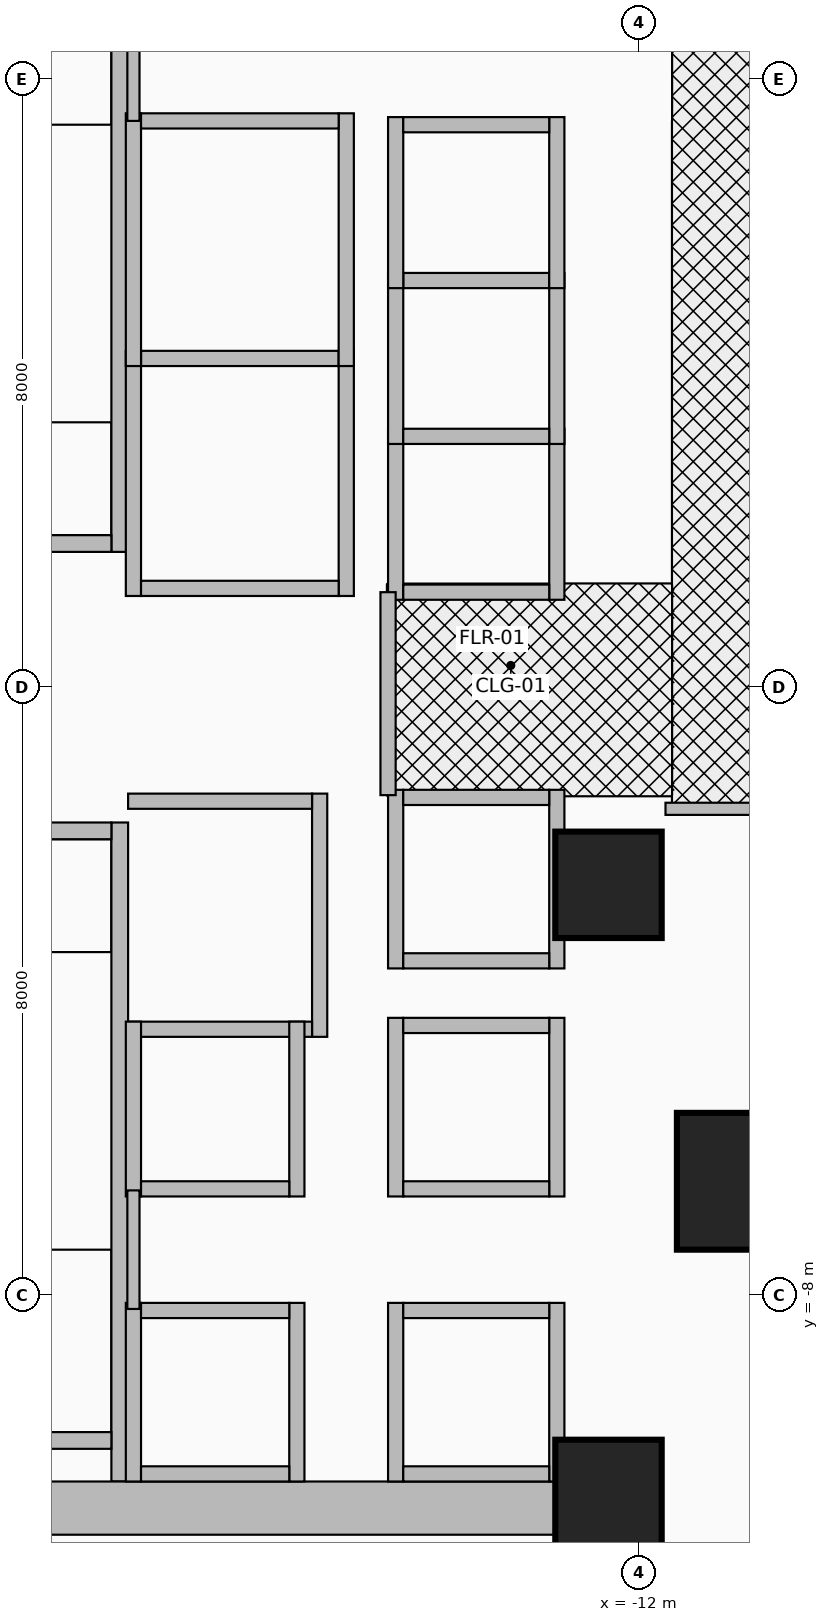
"""IFC4 building model, lengths in metres.
Left out: names, types, materials, properties, quantities, classifications, styles, units other than length and angle.
Written with IfcOpenShell. Run it as: python <this file> out.ifc"""

import sys

from ifc_helpers import new_model, si_unit, direction, frame, frame_2d, origin, origin_2d, place, context, subcontext, project, spatial, rectangle, extrude, source, transform, mapped, element, fill, save


model = new_model("IFC4")
c1 = context("Model", 3, precision=1e-05, world=origin(), true_north=direction((0.0, 1.0)))
c2 = subcontext(c1, "Body", "Model", "MODEL_VIEW")
j1 = project(units=[si_unit("LENGTHUNIT", "METRE"), si_unit("PLANEANGLEUNIT", "RADIAN")], contexts=[c1])
p1 = place(None, origin())
s1 = spatial("IfcSite", under=j1, at=p1, CompositionType="ELEMENT")
p2 = place(p1, origin())
s2 = spatial("IfcBuilding", under=s1, at=p2, CompositionType="ELEMENT")
p3 = place(p2, frame((0.0, 0.0, 20.8)))
s3 = spatial("IfcBuildingStorey", under=s2, at=p3, CompositionType="ELEMENT", Elevation=20.8)
p4 = place(p3, frame((-18.83, 1.78, 0.0), z_axis=(0.0, 0.0, 1.0), x_axis=(0.0, 1.0, 0.0)))
e1 = element("IfcWall", 1, at=p4, inside=s3, PredefinedType="SHEAR", context=c2, shape_type="SweptSolid", body=[
    extrude(rectangle(XDim=8.67, YDim=0.22, at=frame_2d((4.335, 0.0))), origin(), (0.0, 0.0, 1.0), 4.96),
])
p5 = place(p3, frame((-22.05, 1.89, 0.0), z_axis=(0.0, 0.0, 1.0), x_axis=(1.0, 0.0, 0.0)))
e2 = element("IfcWall", 2, at=p5, inside=s3, PredefinedType="SHEAR", context=c2, shape_type="SweptSolid", body=[
    extrude(rectangle(XDim=3.11, YDim=0.22, at=frame_2d((1.555, 0.0))), origin(), (0.0, 0.0, 1.0), 4.96),
])
p6 = place(p5, frame((1.0, 0.0, 0.0)))
e3 = element("IfcOpeningElement", 3, at=p6, cuts=e2, PredefinedType="OPENING", context=c2, shape_type="SweptSolid", body=[
    extrude(rectangle(XDim=1.1, YDim=2.15, at=frame_2d((0.55, 1.075))), frame((0.0, 0.125, 0.0), z_axis=(0.0, -1.0, 0.0), x_axis=(1.0, 0.0, 0.0)), (0.0, 0.0, 1.0), 0.25),
])
p7 = place(p3, frame((-18.83, -10.45, 0.0), z_axis=(0.0, 0.0, 1.0), x_axis=(0.0, 1.0, 0.0)))
e4 = element("IfcWall", 4, at=p7, inside=s3, PredefinedType="SHEAR", context=c2, shape_type="SweptSolid", body=[
    extrude(rectangle(XDim=8.67, YDim=0.22, at=frame_2d((4.335, 0.0))), origin(), (0.0, 0.0, 1.0), 4.96),
])
p8 = place(p3, frame((-22.05, -9.91, 0.0), z_axis=(0.0, 0.0, 1.0), x_axis=(1.0, 0.0, 0.0)))
e5 = element("IfcWall", 5, at=p8, inside=s3, PredefinedType="SHEAR", context=c2, shape_type="SweptSolid", body=[
    extrude(rectangle(XDim=3.11, YDim=0.22, at=frame_2d((1.555, 0.0))), origin(), (0.0, 0.0, 1.0), 4.96),
])
p9 = place(p3, frame((-22.05, -1.89, 0.0), z_axis=(0.0, 0.0, 1.0), x_axis=(1.0, 0.0, 0.0)))
e6 = element("IfcWall", 6, at=p9, inside=s3, PredefinedType="SHEAR", context=c2, shape_type="SweptSolid", body=[
    extrude(rectangle(XDim=3.11, YDim=0.22, at=frame_2d((1.555, 0.0))), origin(), (0.0, 0.0, 1.0), 4.96),
])
p10 = place(p9, frame((1.0, 0.0, 0.0)))
e7 = element("IfcOpeningElement", 7, at=p10, cuts=e6, PredefinedType="OPENING", context=c2, shape_type="SweptSolid", body=[
    extrude(rectangle(XDim=1.1, YDim=2.15, at=frame_2d((0.55, 1.075))), frame((0.0, 0.125, 0.0), z_axis=(0.0, -1.0, 0.0), x_axis=(1.0, 0.0, 0.0)), (0.0, 0.0, 1.0), 0.25),
])
p11 = place(p3, frame((-22.65, -10.8, 0.0), z_axis=(0.0, 0.0, 1.0), x_axis=(1.0, 0.0, 0.0)))
e8 = element("IfcWall", 8, at=p11, inside=s3, PredefinedType="SHEAR", context=c2, shape_type="SweptSolid", body=[
    extrude(rectangle(XDim=10.25, YDim=0.7, at=frame_2d((5.125, 0.0))), origin(), (0.0, 0.0, 1.0), 4.96),
])
m1 = source(origin(), c2, "Body", "SweptSolid", [
    extrude(rectangle(XDim=1.4, YDim=1.4, at=origin_2d()), origin(), (0.0, 0.0, 1.0), 5.2),
])
for number, where, z_axis, x_axis in (
    (9, (-12.4, -10.6, 0.0), (0.0, 0.0, 1.0), (1.0, 0.0, 0.0)),
    (10, (-12.4, -2.6, 0.0), (0.0, 0.0, 1.0), (1.0, 0.0, 0.0)),
):
    element("IfcColumn", number, at=place(p3, frame(where, z_axis=z_axis, x_axis=x_axis)), inside=s3, PredefinedType="COLUMN", context=c2, shape_type="MappedRepresentation", body=[
        mapped(m1, transform((0.0, 0.0, 0.0), x_axis=(1.0, 0.0, 0.0), y_axis=(0.0, 1.0, 0.0), z_axis=(0.0, 0.0, 1.0), scale=1.0)),
    ])
m2 = source(origin(), c2, "Body", "SweptSolid", [
    extrude(rectangle(XDim=1.8, YDim=1.8, at=origin_2d()), origin(), (0.0, 0.0, 1.0), 5.2),
])
p12 = place(p3, frame((-10.6, -6.5, 0.0), z_axis=(0.0, 0.0, 1.0), x_axis=(1.0, 0.0, 0.0)))
e11 = element("IfcColumn", 11, at=p12, inside=s3, PredefinedType="COLUMN", context=c2, shape_type="MappedRepresentation", body=[
    mapped(m2, transform((0.0, 0.0, 0.0), x_axis=(1.0, 0.0, 0.0), y_axis=(0.0, 1.0, 0.0), z_axis=(0.0, 0.0, 1.0), scale=1.0)),
])
for number, where, z_axis, x_axis in (
    (12, (-18.65, 1.2, 0.0), (0.0, 0.0, 1.0), (0.0, 1.0, 0.0)),
    (13, (-15.85, 1.2, 0.0), (0.0, 0.0, 1.0), (0.0, 1.0, 0.0)),
):
    element("IfcWall", number, at=place(p3, frame(where, z_axis=z_axis, x_axis=x_axis)), inside=s3, PredefinedType="MOVABLE", context=c2, shape_type="SweptSolid", body=[
        extrude(rectangle(XDim=3.225, YDim=0.2, at=frame_2d((1.613, 0.0))), origin(), (0.0, 0.0, 1.0), 4.96),
    ])
p13 = place(p3, frame((-18.55, 1.3, 0.0), z_axis=(0.0, 0.0, 1.0), x_axis=(1.0, 0.0, 0.0)))
e14 = element("IfcWall", 14, at=p13, inside=s3, PredefinedType="MOVABLE", context=c2, shape_type="SweptSolid", body=[
    extrude(rectangle(XDim=2.6, YDim=0.2, at=frame_2d((1.3, 0.0))), origin(), (0.0, 0.0, 1.0), 4.96),
])
p14 = place(p13, frame((0.7, 0.0, 0.0)))
e15 = element("IfcOpeningElement", 15, at=p14, cuts=e14, PredefinedType="OPENING", context=c2, shape_type="SweptSolid", body=[
    extrude(rectangle(XDim=1.2, YDim=2.1, at=frame_2d((0.6, 1.05))), frame((0.0, 0.115, 0.0), z_axis=(0.0, -1.0, 0.0), x_axis=(1.0, 0.0, 0.0)), (0.0, 0.0, 1.0), 0.23),
])
p15 = place(p3, frame((-18.55, 4.325, 0.0), z_axis=(0.0, 0.0, 1.0), x_axis=(1.0, 0.0, 0.0)))
e16 = element("IfcWall", 16, at=p15, inside=s3, PredefinedType="MOVABLE", context=c2, shape_type="SweptSolid", body=[
    extrude(rectangle(XDim=2.6, YDim=0.2, at=frame_2d((1.3, 0.0))), origin(), (0.0, 0.0, 1.0), 4.96),
])
p16 = place(p3, frame((-16.2, -4.6, 0.0), z_axis=(0.0, 0.0, 1.0), x_axis=(0.0, 1.0, 0.0)))
e17 = element("IfcWall", 17, at=p16, inside=s3, PredefinedType="MOVABLE", context=c2, shape_type="SweptSolid", body=[
    extrude(rectangle(XDim=3.2, YDim=0.2, at=frame_2d((1.6, 0.0))), origin(), (0.0, 0.0, 1.0), 4.96),
])
p17 = place(p3, frame((-18.72, -4.5, 0.0), z_axis=(0.0, 0.0, 1.0), x_axis=(1.0, 0.0, 0.0)))
e18 = element("IfcWall", 18, at=p17, inside=s3, PredefinedType="MOVABLE", context=c2, shape_type="SweptSolid", body=[
    extrude(rectangle(XDim=2.42, YDim=0.2, at=frame_2d((1.21, 0.0))), origin(), (0.0, 0.0, 1.0), 4.96),
])
p18 = place(p3, frame((-18.72, -1.5, 0.0), z_axis=(0.0, 0.0, 1.0), x_axis=(1.0, 0.0, 0.0)))
e19 = element("IfcWall", 19, at=p18, inside=s3, PredefinedType="MOVABLE", context=c2, shape_type="SweptSolid", body=[
    extrude(rectangle(XDim=2.42, YDim=0.2, at=frame_2d((1.21, 0.0))), origin(), (0.0, 0.0, 1.0), 4.96),
])
p19 = place(p18, frame((0.61, 0.0, 0.0)))
e20 = element("IfcOpeningElement", 20, at=p19, cuts=e19, PredefinedType="OPENING", context=c2, shape_type="SweptSolid", body=[
    extrude(rectangle(XDim=1.2, YDim=2.1, at=frame_2d((0.6, 1.05))), frame((0.0, 0.115, 0.0), z_axis=(0.0, -1.0, 0.0), x_axis=(1.0, 0.0, 0.0)), (0.0, 0.0, 1.0), 0.23),
])
for number, where, z_axis, x_axis in (
    (21, (-18.65, 4.225, 0.0), (0.0, 0.0, 1.0), (0.0, 1.0, 0.0)),
    (22, (-15.85, 4.225, 0.0), (0.0, 0.0, 1.0), (0.0, 1.0, 0.0)),
):
    element("IfcWall", number, at=place(p3, frame(where, z_axis=z_axis, x_axis=x_axis)), inside=s3, PredefinedType="MOVABLE", context=c2, shape_type="SweptSolid", body=[
        extrude(rectangle(XDim=3.325, YDim=0.2, at=frame_2d((1.663, 0.0))), origin(), (0.0, 0.0, 1.0), 4.96),
    ])
p20 = place(p3, frame((-18.55, 7.45, 0.0), z_axis=(0.0, 0.0, 1.0), x_axis=(1.0, 0.0, 0.0)))
e23 = element("IfcWall", 23, at=p20, inside=s3, PredefinedType="MOVABLE", context=c2, shape_type="SweptSolid", body=[
    extrude(rectangle(XDim=2.6, YDim=0.2, at=frame_2d((1.3, 0.0))), origin(), (0.0, 0.0, 1.0), 4.96),
])
p21 = place(p20, frame((0.7, 0.0, 0.0)))
e24 = element("IfcOpeningElement", 24, at=p21, cuts=e23, PredefinedType="OPENING", context=c2, shape_type="SweptSolid", body=[
    extrude(rectangle(XDim=1.2, YDim=2.1, at=frame_2d((0.6, 1.05))), frame((0.0, 0.115, 0.0), z_axis=(0.0, -1.0, 0.0), x_axis=(1.0, 0.0, 0.0)), (0.0, 0.0, 1.0), 0.23),
])
for number, where, z_axis, x_axis in (
    (25, (-15.2, -10.45, 0.0), (0.0, 0.0, 1.0), (0.0, 1.0, 0.0)),
    (26, (-13.08, -10.45, 0.0), (0.0, 0.0, 1.0), (0.0, 1.0, 0.0)),
):
    element("IfcWall", number, at=place(p3, frame(where, z_axis=z_axis, x_axis=x_axis)), inside=s3, PredefinedType="MOVABLE", context=c2, shape_type="SweptSolid", body=[
        extrude(rectangle(XDim=2.35, YDim=0.2, at=frame_2d((1.175, 0.0))), origin(), (0.0, 0.0, 1.0), 3.745),
    ])
p22 = place(p3, frame((-15.1, -10.35, 0.0), z_axis=(0.0, 0.0, 1.0), x_axis=(1.0, 0.0, 0.0)))
e27 = element("IfcWall", 27, at=p22, inside=s3, PredefinedType="MOVABLE", context=c2, shape_type="SweptSolid", body=[
    extrude(rectangle(XDim=1.92, YDim=0.2, at=frame_2d((0.96, 0.0))), origin(), (0.0, 0.0, 1.0), 3.745),
])
p23 = place(p3, frame((-15.1, -8.2, 0.0), z_axis=(0.0, 0.0, 1.0), x_axis=(1.0, 0.0, 0.0)))
e28 = element("IfcWall", 28, at=p23, inside=s3, PredefinedType="MOVABLE", context=c2, shape_type="SweptSolid", body=[
    extrude(rectangle(XDim=1.92, YDim=0.2, at=frame_2d((0.96, 0.0))), origin(), (0.0, 0.0, 1.0), 4.96),
])
p24 = place(p23, frame((0.41, 0.0, 0.0)))
e29 = element("IfcOpeningElement", 29, at=p24, cuts=e28, PredefinedType="OPENING", context=c2, shape_type="SweptSolid", body=[
    extrude(rectangle(XDim=1.1, YDim=2.1, at=frame_2d((0.55, 1.05))), frame((0.0, 0.115, 0.0), z_axis=(0.0, -1.0, 0.0), x_axis=(1.0, 0.0, 0.0)), (0.0, 0.0, 1.0), 0.23),
])
for number, where, z_axis, x_axis in (
    (30, (-15.2, -6.7, 0.0), (0.0, 0.0, 1.0), (0.0, 1.0, 0.0)),
    (31, (-13.08, -6.7, 0.0), (0.0, 0.0, 1.0), (0.0, 1.0, 0.0)),
):
    element("IfcWall", number, at=place(p3, frame(where, z_axis=z_axis, x_axis=x_axis)), inside=s3, PredefinedType="MOVABLE", context=c2, shape_type="SweptSolid", body=[
        extrude(rectangle(XDim=2.35, YDim=0.2, at=frame_2d((1.175, 0.0))), origin(), (0.0, 0.0, 1.0), 4.96),
    ])
p25 = place(p3, frame((-15.1, -6.6, 0.0), z_axis=(0.0, 0.0, 1.0), x_axis=(1.0, 0.0, 0.0)))
e32 = element("IfcWall", 32, at=p25, inside=s3, PredefinedType="MOVABLE", context=c2, shape_type="SweptSolid", body=[
    extrude(rectangle(XDim=1.92, YDim=0.2, at=frame_2d((0.96, 0.0))), origin(), (0.0, 0.0, 1.0), 4.96),
])
p26 = place(p25, frame((0.41, 0.0, 0.0)))
e33 = element("IfcOpeningElement", 33, at=p26, cuts=e32, PredefinedType="OPENING", context=c2, shape_type="SweptSolid", body=[
    extrude(rectangle(XDim=1.1, YDim=2.1, at=frame_2d((0.55, 1.05))), frame((0.0, 0.115, 0.0), z_axis=(0.0, -1.0, 0.0), x_axis=(1.0, 0.0, 0.0)), (0.0, 0.0, 1.0), 0.23),
])
p27 = place(p3, frame((-15.1, -4.45, 0.0), z_axis=(0.0, 0.0, 1.0), x_axis=(1.0, 0.0, 0.0)))
e34 = element("IfcWall", 34, at=p27, inside=s3, PredefinedType="MOVABLE", context=c2, shape_type="SweptSolid", body=[
    extrude(rectangle(XDim=1.92, YDim=0.2, at=frame_2d((0.96, 0.0))), origin(), (0.0, 0.0, 1.0), 4.96),
])
for number, where, z_axis, x_axis in (
    (35, (-18.65, -10.45, 0.0), (0.0, 0.0, 1.0), (0.0, 1.0, 0.0)),
    (36, (-16.5, -10.45, 0.0), (0.0, 0.0, 1.0), (0.0, 1.0, 0.0)),
):
    element("IfcWall", number, at=place(p3, frame(where, z_axis=z_axis, x_axis=x_axis)), inside=s3, PredefinedType="MOVABLE", context=c2, shape_type="SweptSolid", body=[
        extrude(rectangle(XDim=2.35, YDim=0.2, at=frame_2d((1.175, 0.0))), origin(), (0.0, 0.0, 1.0), 3.745),
    ])
p28 = place(p3, frame((-18.55, -10.35, 0.0), z_axis=(0.0, 0.0, 1.0), x_axis=(1.0, 0.0, 0.0)))
e37 = element("IfcWall", 37, at=p28, inside=s3, PredefinedType="MOVABLE", context=c2, shape_type="SweptSolid", body=[
    extrude(rectangle(XDim=1.95, YDim=0.2, at=frame_2d((0.975, 0.0))), origin(), (0.0, 0.0, 1.0), 3.745),
])
p29 = place(p3, frame((-18.55, -8.2, 0.0), z_axis=(0.0, 0.0, 1.0), x_axis=(1.0, 0.0, 0.0)))
e38 = element("IfcWall", 38, at=p29, inside=s3, PredefinedType="MOVABLE", context=c2, shape_type="SweptSolid", body=[
    extrude(rectangle(XDim=1.95, YDim=0.2, at=frame_2d((0.975, 0.0))), origin(), (0.0, 0.0, 1.0), 4.96),
])
for number, where, z_axis, x_axis in (
    (39, (-15.2, 1.15, 0.0), (0.0, 0.0, 1.0), (0.0, 1.0, 0.0)),
    (40, (-13.08, 1.15, 0.0), (0.0, 0.0, 1.0), (0.0, 1.0, 0.0)),
):
    element("IfcWall", number, at=place(p3, frame(where, z_axis=z_axis, x_axis=x_axis)), inside=s3, PredefinedType="MOVABLE", context=c2, shape_type="SweptSolid", body=[
        extrude(rectangle(XDim=2.25, YDim=0.2, at=frame_2d((1.125, 0.0))), origin(), (0.0, 0.0, 1.0), 4.96),
    ])
p30 = place(p3, frame((-15.1, 1.25, 0.0), z_axis=(0.0, 0.0, 1.0), x_axis=(1.0, 0.0, 0.0)))
e41 = element("IfcWall", 41, at=p30, inside=s3, PredefinedType="MOVABLE", context=c2, shape_type="SweptSolid", body=[
    extrude(rectangle(XDim=1.92, YDim=0.2, at=frame_2d((0.96, 0.0))), origin(), (0.0, 0.0, 1.0), 4.96),
])
for number, where, z_axis, x_axis in (
    (42, (-15.2, 3.2, 0.0), (0.0, 0.0, 1.0), (0.0, 1.0, 0.0)),
    (43, (-13.08, 3.2, 0.0), (0.0, 0.0, 1.0), (0.0, 1.0, 0.0)),
):
    element("IfcWall", number, at=place(p3, frame(where, z_axis=z_axis, x_axis=x_axis)), inside=s3, PredefinedType="MOVABLE", context=c2, shape_type="SweptSolid", body=[
        extrude(rectangle(XDim=2.25, YDim=0.2, at=frame_2d((1.125, 0.0))), origin(), (0.0, 0.0, 1.0), 4.96),
    ])
for number, where, z_axis, x_axis in (
    (44, (-15.1, 3.3, 0.0), (0.0, 0.0, 1.0), (1.0, 0.0, 0.0)),
    (45, (-15.1, 5.35, 0.0), (0.0, 0.0, 1.0), (1.0, 0.0, 0.0)),
):
    element("IfcWall", number, at=place(p3, frame(where, z_axis=z_axis, x_axis=x_axis)), inside=s3, PredefinedType="MOVABLE", context=c2, shape_type="SweptSolid", body=[
        extrude(rectangle(XDim=1.92, YDim=0.2, at=frame_2d((0.96, 0.0))), origin(), (0.0, 0.0, 1.0), 4.96),
    ])
for number, where, z_axis, x_axis in (
    (46, (-15.2, 5.25, 0.0), (0.0, 0.0, 1.0), (0.0, 1.0, 0.0)),
    (47, (-13.08, 5.25, 0.0), (0.0, 0.0, 1.0), (0.0, 1.0, 0.0)),
):
    element("IfcWall", number, at=place(p3, frame(where, z_axis=z_axis, x_axis=x_axis)), inside=s3, PredefinedType="MOVABLE", context=c2, shape_type="SweptSolid", body=[
        extrude(rectangle(XDim=2.25, YDim=0.2, at=frame_2d((1.125, 0.0))), origin(), (0.0, 0.0, 1.0), 4.96),
    ])
p31 = place(p3, frame((-15.1, 7.4, 0.0), z_axis=(0.0, 0.0, 1.0), x_axis=(1.0, 0.0, 0.0)))
e48 = element("IfcWall", 48, at=p31, inside=s3, PredefinedType="MOVABLE", context=c2, shape_type="SweptSolid", body=[
    extrude(rectangle(XDim=1.92, YDim=0.2, at=frame_2d((0.96, 0.0))), origin(), (0.0, 0.0, 1.0), 4.96),
])
for number, where, z_axis, x_axis in (
    (49, (-18.65, -6.7, 0.0), (0.0, 0.0, 1.0), (0.0, 1.0, 0.0)),
    (50, (-16.5, -6.7, 0.0), (0.0, 0.0, 1.0), (0.0, 1.0, 0.0)),
):
    element("IfcWall", number, at=place(p3, frame(where, z_axis=z_axis, x_axis=x_axis)), inside=s3, PredefinedType="MOVABLE", context=c2, shape_type="SweptSolid", body=[
        extrude(rectangle(XDim=2.3, YDim=0.2, at=frame_2d((1.15, 0.0))), origin(), (0.0, 0.0, 1.0), 4.96),
    ])
p32 = place(p3, frame((-18.55, -6.6, 0.0), z_axis=(0.0, 0.0, 1.0), x_axis=(1.0, 0.0, 0.0)))
e51 = element("IfcWall", 51, at=p32, inside=s3, PredefinedType="MOVABLE", context=c2, shape_type="SweptSolid", body=[
    extrude(rectangle(XDim=1.95, YDim=0.2, at=frame_2d((0.975, 0.0))), origin(), (0.0, 0.0, 1.0), 4.96),
])
for number, where, z_axis, x_axis in (
    (52, (-15.2, -3.7, 0.0), (0.0, 0.0, 1.0), (0.0, 1.0, 0.0)),
    (53, (-13.08, -3.7, 0.0), (0.0, 0.0, 1.0), (0.0, 1.0, 0.0)),
):
    element("IfcWall", number, at=place(p3, frame(where, z_axis=z_axis, x_axis=x_axis)), inside=s3, PredefinedType="MOVABLE", context=c2, shape_type="SweptSolid", body=[
        extrude(rectangle(XDim=2.35, YDim=0.2, at=frame_2d((1.175, 0.0))), origin(), (0.0, 0.0, 1.0), 4.96),
    ])
for number, where, z_axis, x_axis in (
    (54, (-15.1, -3.6, 0.0), (0.0, 0.0, 1.0), (1.0, 0.0, 0.0)),
    (55, (-15.1, -1.45, 0.0), (0.0, 0.0, 1.0), (1.0, 0.0, 0.0)),
):
    element("IfcWall", number, at=place(p3, frame(where, z_axis=z_axis, x_axis=x_axis)), inside=s3, PredefinedType="MOVABLE", context=c2, shape_type="SweptSolid", body=[
        extrude(rectangle(XDim=1.92, YDim=0.2, at=frame_2d((0.96, 0.0))), origin(), (0.0, 0.0, 1.0), 4.96),
    ])
p33 = place(p3, frame((-15.3, -1.42, 0.0), z_axis=(0.0, 0.0, 1.0), x_axis=(0.0, 1.0, 0.0)))
e56 = element("IfcWall", 56, at=p33, inside=s3, PredefinedType="PARTITIONING", context=c2, shape_type="SweptSolid", body=[
    extrude(rectangle(XDim=2.67, YDim=0.2, at=frame_2d((1.335, 0.0))), origin(), (0.0, 0.0, 1.0), 4.96),
])
p34 = place(p33, frame((0.78, 0.0, 0.0)))
e57 = element("IfcOpeningElement", 57, at=p34, cuts=e56, PredefinedType="OPENING", context=c2, shape_type="SweptSolid", body=[
    extrude(rectangle(XDim=1.05, YDim=2.15, at=frame_2d((0.525, 1.075))), frame((0.0, 0.115, 0.0), z_axis=(0.0, -1.0, 0.0), x_axis=(1.0, 0.0, 0.0)), (0.0, 0.0, 1.0), 0.23),
])
p35 = place(p3, frame((-18.65, 7.45, 0.0), z_axis=(0.0, 0.0, 1.0), x_axis=(0.0, 1.0, 0.0)))
e58 = element("IfcWall", 58, at=p35, inside=s3, PredefinedType="PARTITIONING", context=c2, shape_type="SweptSolid", body=[
    extrude(rectangle(XDim=2.93, YDim=0.16, at=frame_2d((1.465, 0.0))), origin(), (0.0, 0.0, 1.0), 3.745),
])
p36 = place(p3, frame((-18.65, -8.18, 0.0), z_axis=(0.0, 0.0, 1.0), x_axis=(0.0, 1.0, 0.0)))
e59 = element("IfcWall", 59, at=p36, inside=s3, PredefinedType="PARTITIONING", context=c2, shape_type="SweptSolid", body=[
    extrude(rectangle(XDim=1.56, YDim=0.16, at=frame_2d((0.78, 0.0))), origin(), (0.0, 0.0, 1.0), 4.96),
])
p37 = place(p3, frame((-11.65, -1.6, 0.0), z_axis=(0.0, 0.0, 1.0), x_axis=(1.0, 0.0, 0.0)))
e60 = element("IfcWall", 60, at=p37, inside=s3, PredefinedType="PARTITIONING", context=c2, shape_type="SweptSolid", body=[
    extrude(rectangle(XDim=1.85, YDim=0.16, at=frame_2d((0.925, 0.0))), origin(), (0.0, 0.0, 1.0), 4.96),
])
p38 = place(p14, origin())
e61 = element("IfcDoor", 61, at=p38, inside=s3, OperationType="DOUBLE_DOOR_SLIDING", PredefinedType="DOOR", context=c2, shape_type="SweptSolid", body=[
    extrude(rectangle(XDim=1.2, YDim=2.1, at=frame_2d((0.6, 1.05))), frame((0.0, 0.025, 0.0), z_axis=(0.0, -1.0, 0.0), x_axis=(1.0, 0.0, 0.0)), (0.0, 0.0, 1.0), 0.05),
])
fill(e15, e61)
p39 = place(p19, origin())
e62 = element("IfcDoor", 62, at=p39, inside=s3, OperationType="DOUBLE_DOOR_SLIDING", PredefinedType="DOOR", context=c2, shape_type="SweptSolid", body=[
    extrude(rectangle(XDim=1.2, YDim=2.1, at=frame_2d((0.6, 1.05))), frame((0.0, 0.025, 0.0), z_axis=(0.0, -1.0, 0.0), x_axis=(1.0, 0.0, 0.0)), (0.0, 0.0, 1.0), 0.05),
])
fill(e20, e62)
p40 = place(p21, origin())
e63 = element("IfcDoor", 63, at=p40, inside=s3, OperationType="DOUBLE_DOOR_SLIDING", PredefinedType="DOOR", context=c2, shape_type="SweptSolid", body=[
    extrude(rectangle(XDim=1.2, YDim=2.1, at=frame_2d((0.6, 1.05))), frame((0.0, 0.025, 0.0), z_axis=(0.0, -1.0, 0.0), x_axis=(1.0, 0.0, 0.0)), (0.0, 0.0, 1.0), 0.05),
])
fill(e24, e63)
p41 = place(p24, origin())
e64 = element("IfcDoor", 64, at=p41, inside=s3, OperationType="DOUBLE_DOOR_SLIDING", PredefinedType="DOOR", context=c2, shape_type="SweptSolid", body=[
    extrude(rectangle(XDim=1.1, YDim=2.1, at=frame_2d((0.55, 1.05))), frame((0.0, 0.025, 0.0), z_axis=(0.0, -1.0, 0.0), x_axis=(1.0, 0.0, 0.0)), (0.0, 0.0, 1.0), 0.05),
])
fill(e29, e64)
p42 = place(p26, origin())
e65 = element("IfcDoor", 65, at=p42, inside=s3, OperationType="DOUBLE_DOOR_SLIDING", PredefinedType="DOOR", context=c2, shape_type="SweptSolid", body=[
    extrude(rectangle(XDim=1.1, YDim=2.1, at=frame_2d((0.55, 1.05))), frame((0.0, 0.025, 0.0), z_axis=(0.0, -1.0, 0.0), x_axis=(1.0, 0.0, 0.0)), (0.0, 0.0, 1.0), 0.05),
])
fill(e33, e65)
p43 = place(p34, origin())
e66 = element("IfcDoor", 66, at=p43, inside=s3, OperationType="SINGLE_SWING_RIGHT", PredefinedType="DOOR", context=c2, shape_type="SweptSolid", body=[
    extrude(rectangle(XDim=1.05, YDim=2.15, at=frame_2d((0.525, 1.075))), frame((0.0, 0.025, 0.0), z_axis=(0.0, -1.0, 0.0), x_axis=(1.0, 0.0, 0.0)), (0.0, 0.0, 1.0), 0.05),
])
fill(e57, e66)
save(model, sys.argv[1])
